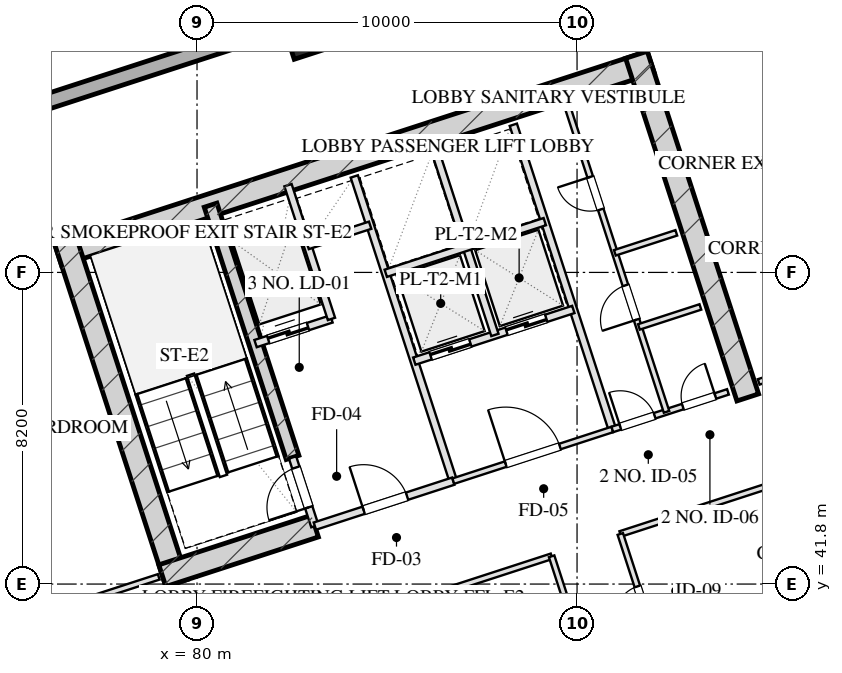
"""IFC4 building model, lengths in metres.
Left out: names, types, materials, properties, quantities, classifications, styles, units other than length and angle.
Written with IfcOpenShell. Run it as: python <this file> out.ifc"""

import sys

from ifc_helpers import new_model, si_unit, direction, frame, frame_2d, origin, origin_2d, place, context, subcontext, project, spatial, rectangle, hollow_rectangle, extrude, element, fill, save


model = new_model("IFC4")
c1 = context("Model", 3, precision=1e-05, world=origin(), true_north=direction((0.0, 1.0)))
c2 = subcontext(c1, "Body", "Model", "MODEL_VIEW")
j1 = project(units=[si_unit("LENGTHUNIT", "METRE"), si_unit("PLANEANGLEUNIT", "RADIAN")], contexts=[c1])
p1 = place(None, origin())
s1 = spatial("IfcSite", under=j1, at=p1, CompositionType="ELEMENT")
p2 = place(p1, origin())
s2 = spatial("IfcBuilding", under=s1, at=p2, CompositionType="ELEMENT")
p3 = place(p2, frame((0.0, 0.0, 166.75)))
s3 = spatial("IfcBuildingStorey", under=s2, at=p3, CompositionType="ELEMENT", Elevation=166.75)
p4 = place(p3, frame((76.344, 50.466, 0.0), z_axis=(0.0, 0.0, 1.0), x_axis=(0.951055727519, 0.309019421968, 0.0)))
e1 = element("IfcWall", 1, at=p4, inside=s3, PredefinedType="SHEAR", context=c2, shape_type="SweptSolid", body=[
    extrude(rectangle(XDim=16.4, YDim=0.6, at=frame_2d((8.2, 0.0))), origin(), (0.0, 0.0, 1.0), 3.45),
])
for number, where, z_axis, x_axis in (
    (2, (79.466, 41.828, 0.0), (0.0, 0.0, 1.0), (-0.309, 0.951, 0.0)),
    (3, (94.492, 46.71, 0.0), (0.0, 0.0, 1.0), (-0.309, 0.951, 0.0)),
):
    element("IfcWall", number, at=place(p3, frame(where, z_axis=z_axis, x_axis=x_axis)), inside=s3, PredefinedType="SHEAR", context=c2, shape_type="SweptSolid", body=[
        extrude(rectangle(XDim=9.48, YDim=0.6, at=frame_2d((4.74, 0.0))), origin(), (0.0, 0.0, 1.0), 3.45),
    ])
p5 = place(p3, frame((82.514, 45.131, 0.0), z_axis=(0.0, 0.0, 1.0), x_axis=(-0.308988790936, 0.951065679686, 0.0)))
e4 = element("IfcWall", 4, at=p5, inside=s3, PredefinedType="SHEAR", context=c2, shape_type="SweptSolid", body=[
    extrude(rectangle(XDim=6.98, YDim=0.35, at=frame_2d((3.49, 0.0))), origin(), (0.0, 0.0, 1.0), 3.45),
])
p6 = place(p3, frame((79.087, 42.021, 0.0), z_axis=(0.0, 0.0, 1.0), x_axis=(0.951062550203, 0.3089984233, 0.0)))
e5 = element("IfcWall", 5, at=p6, inside=s3, PredefinedType="SHEAR", context=c2, shape_type="SweptSolid", body=[
    extrude(rectangle(XDim=4.22, YDim=0.6, at=frame_2d((2.11, 0.0))), origin(), (0.0, 0.0, 1.0), 3.45),
])
p7 = place(p3, frame((82.815, 56.112, 0.0), z_axis=(0.0, 0.0, 1.0), x_axis=(0.951056516295, 0.309016994375, 0.0)))
e6 = element("IfcColumn", 6, at=p7, inside=s3, PredefinedType="COLUMN", context=c2, shape_type="SweptSolid", body=[
    extrude(hollow_rectangle(XDim=0.8, YDim=0.8, WallThickness=0.028, at=origin_2d()), origin(), (0.0, 0.0, 1.0), 3.451),
])
p8 = place(p3, frame((81.776, 8.827, 0.0), z_axis=(0.0, 0.0, 1.0), x_axis=(-0.309014228706, 0.951057414911, 0.0)))
e7 = element("IfcWall", 7, at=p8, inside=s3, PredefinedType="SOLIDWALL", context=c2, shape_type="SweptSolid", body=[
    extrude(rectangle(XDim=42.8, YDim=0.4, at=frame_2d((21.4, 0.0))), origin(), (0.0, 0.0, 1.0), 2.61),
])
p9 = place(p8, frame((17.75, 0.0, 0.0)))
e8 = element("IfcOpeningElement", 8, at=p9, cuts=e7, PredefinedType="OPENING", context=c2, shape_type="SweptSolid", body=[
    extrude(rectangle(XDim=1.1, YDim=2.15, at=frame_2d((0.55, 1.075))), frame((0.0, 0.21, 0.0), z_axis=(0.0, -1.0, 0.0), x_axis=(1.0, 0.0, 0.0)), (0.0, 0.0, 1.0), 0.42),
])
p10 = place(p3, frame((70.092, 52.556, 0.0), z_axis=(0.0, 0.0, 1.0), x_axis=(0.951057580055, 0.30901372044, 0.0)))
e9 = element("IfcWall", 9, at=p10, inside=s3, PredefinedType="SOLIDWALL", context=c2, shape_type="SweptSolid", body=[
    extrude(rectangle(XDim=26.4, YDim=0.4, at=frame_2d((13.2, 0.0))), origin(), (0.0, 0.0, 1.0), 2.61),
])
p11 = place(p3, frame((83.101, 43.324, 0.0), z_axis=(0.0, 0.0, 1.0), x_axis=(-0.309048298632, 0.951046344356, 0.0)))
e10 = element("IfcWall", 10, at=p11, inside=s3, PredefinedType="PARTITIONING", context=c2, shape_type="SweptSolid", body=[
    extrude(rectangle(XDim=1.9, YDim=0.2, at=frame_2d((0.95, 0.0))), origin(), (0.0, 0.0, 1.0), 3.175),
])
p12 = place(p11, frame((0.52, 0.0, 0.0)))
e11 = element("IfcOpeningElement", 11, at=p12, cuts=e10, PredefinedType="OPENING", context=c2, shape_type="SweptSolid", body=[
    extrude(rectangle(XDim=1.1, YDim=2.05, at=frame_2d((0.55, 1.025))), frame((0.0, 0.11, 0.0), z_axis=(0.0, -1.0, 0.0), x_axis=(1.0, 0.0, 0.0)), (0.0, 0.0, 1.0), 0.22),
])
p13 = place(p3, frame((86.743, 44.508, 0.0), z_axis=(0.0, 0.0, 1.0), x_axis=(-0.309016001439, 0.951056838919, 0.0)))
e12 = element("IfcWall", 12, at=p13, inside=s3, PredefinedType="PARTITIONING", context=c2, shape_type="SweptSolid", body=[
    extrude(rectangle(XDim=8.43, YDim=0.2, at=frame_2d((4.215, 0.0))), origin(), (0.0, 0.0, 1.0), 3.175),
])
p14 = place(p3, frame((83.101, 43.324, 0.0), z_axis=(0.0, 0.0, 1.0), x_axis=(0.951052804469, 0.309028417967, 0.0)))
e13 = element("IfcWall", 13, at=p14, inside=s3, PredefinedType="PARTITIONING", context=c2, shape_type="SweptSolid", body=[
    extrude(rectangle(XDim=3.83, YDim=0.2, at=frame_2d((1.915, 0.0))), origin(), (0.0, 0.0, 1.0), 3.175),
])
p15 = place(p14, frame((1.35, 0.0, 0.0)))
e14 = element("IfcOpeningElement", 14, at=p15, cuts=e13, PredefinedType="OPENING", context=c2, shape_type="SweptSolid", body=[
    extrude(rectangle(XDim=1.2, YDim=2.05, at=frame_2d((0.6, 1.025))), frame((0.0, 0.11, 0.0), z_axis=(0.0, -1.0, 0.0), x_axis=(1.0, 0.0, 0.0)), (0.0, 0.0, 1.0), 0.22),
])
p16 = place(p3, frame((81.54, 48.127, 0.0), z_axis=(0.0, 0.0, 1.0), x_axis=(0.951062257173, 0.308999325213, 0.0)))
e15 = element("IfcWall", 15, at=p16, inside=s3, PredefinedType="PARTITIONING", context=c2, shape_type="SweptSolid", body=[
    extrude(rectangle(XDim=2.1, YDim=0.2, at=frame_2d((1.05, 0.0))), origin(), (0.0, 0.0, 1.0), 3.175),
])
p17 = place(p16, frame((0.35, 0.0, 0.0)))
e16 = element("IfcOpeningElement", 16, at=p17, cuts=e15, PredefinedType="OPENING", context=c2, shape_type="SweptSolid", body=[
    extrude(rectangle(XDim=1.1, YDim=2.05, at=frame_2d((0.55, 1.025))), frame((0.0, 0.11, 0.0), z_axis=(0.0, -1.0, 0.0), x_axis=(1.0, 0.0, 0.0)), (0.0, 0.0, 1.0), 0.22),
])
p18 = place(p3, frame((83.538, 48.776, 0.0), z_axis=(0.0, 0.0, 1.0), x_axis=(-0.3089935693, 0.951064127245, 0.0)))
e17 = element("IfcWall", 17, at=p18, inside=s3, PredefinedType="PARTITIONING", context=c2, shape_type="SweptSolid", body=[
    extrude(rectangle(XDim=3.7, YDim=0.2, at=frame_2d((1.85, 0.0))), origin(), (0.0, 0.0, 1.0), 3.175),
])
p19 = place(p3, frame((82.91, 50.707, 0.0), z_axis=(0.0, 0.0, 1.0), x_axis=(0.951041328149, 0.309063734775, 0.0)))
e18 = element("IfcWall", 18, at=p19, inside=s3, PredefinedType="PARTITIONING", context=c2, shape_type="SweptSolid", body=[
    extrude(rectangle(XDim=1.73, YDim=0.2, at=frame_2d((0.865, 0.0))), origin(), (0.0, 0.0, 1.0), 3.175),
])
p20 = place(p3, frame((90.928, 45.868, 0.0), z_axis=(0.0, 0.0, 1.0), x_axis=(-0.309042196757, 0.951048327176, 0.0)))
e19 = element("IfcWall", 19, at=p20, inside=s3, PredefinedType="PARTITIONING", context=c2, shape_type="SweptSolid", body=[
    extrude(rectangle(XDim=8.43, YDim=0.2, at=frame_2d((4.215, 0.0))), origin(), (0.0, 0.0, 1.0), 3.175),
])
p21 = place(p3, frame((86.743, 44.508, 0.0), z_axis=(0.0, 0.0, 1.0), x_axis=(0.951063829732, 0.308994485023, 0.0)))
e20 = element("IfcWall", 20, at=p21, inside=s3, PredefinedType="PARTITIONING", context=c2, shape_type="SweptSolid", body=[
    extrude(rectangle(XDim=4.4, YDim=0.15, at=frame_2d((2.2, 0.0))), origin(), (0.0, 0.0, 1.0), 3.175),
])
p22 = place(p21, frame((1.45, 0.0, 0.0)))
e21 = element("IfcOpeningElement", 21, at=p22, cuts=e20, PredefinedType="OPENING", context=c2, shape_type="SweptSolid", body=[
    extrude(rectangle(XDim=1.5, YDim=2.05, at=frame_2d((0.75, 1.025))), frame((0.0, 0.085, 0.0), z_axis=(0.0, -1.0, 0.0), x_axis=(1.0, 0.0, 0.0)), (0.0, 0.0, 1.0), 0.17),
])
p23 = place(p3, frame((85.718, 47.666, 0.0), z_axis=(0.0, 0.0, 1.0), x_axis=(0.951058531764, 0.30901079133, 0.0)))
e22 = element("IfcWall", 22, at=p23, inside=s3, PredefinedType="PARTITIONING", context=c2, shape_type="SweptSolid", body=[
    extrude(rectangle(XDim=4.4, YDim=0.2, at=frame_2d((2.2, 0.0))), origin(), (0.0, 0.0, 1.0), 3.175),
])
p24 = place(p23, frame((0.45, 0.0, 0.0)))
e23 = element("IfcOpeningElement", 23, at=p24, cuts=e22, PredefinedType="OPENING", context=c2, shape_type="SweptSolid", body=[
    extrude(rectangle(XDim=1.1, YDim=2.05, at=frame_2d((0.55, 1.025))), frame((0.0, 0.11, 0.0), z_axis=(0.0, -1.0, 0.0), x_axis=(1.0, 0.0, 0.0)), (0.0, 0.0, 1.0), 0.22),
])
p25 = place(p23, frame((2.55, 0.0, 0.0)))
e24 = element("IfcOpeningElement", 24, at=p25, cuts=e22, PredefinedType="OPENING", context=c2, shape_type="SweptSolid", body=[
    extrude(rectangle(XDim=1.1, YDim=2.05, at=frame_2d((0.55, 1.025))), frame((0.0, 0.11, 0.0), z_axis=(0.0, -1.0, 0.0), x_axis=(1.0, 0.0, 0.0)), (0.0, 0.0, 1.0), 0.22),
])
p26 = place(p3, frame((87.838, 48.354, 0.0), z_axis=(0.0, 0.0, 1.0), x_axis=(-0.3090093719, 0.951058992953, 0.0)))
e25 = element("IfcWall", 25, at=p26, inside=s3, PredefinedType="PARTITIONING", context=c2, shape_type="SweptSolid", body=[
    extrude(rectangle(XDim=5.11, YDim=0.2, at=frame_2d((2.555, 0.0))), origin(), (0.0, 0.0, 1.0), 3.175),
])
p27 = place(p3, frame((84.967, 49.977, 0.0), z_axis=(0.0, 0.0, 1.0), x_axis=(0.951063829732, 0.308994485023, 0.0)))
e26 = element("IfcWall", 26, at=p27, inside=s3, PredefinedType="PARTITIONING", context=c2, shape_type="SweptSolid", body=[
    extrude(rectangle(XDim=4.4, YDim=0.2, at=frame_2d((2.2, 0.0))), origin(), (0.0, 0.0, 1.0), 3.175),
])
p28 = place(p3, frame((90.928, 45.868, 0.0), z_axis=(0.0, 0.0, 1.0), x_axis=(0.951059297078, 0.309008435874, 0.0)))
e27 = element("IfcWall", 27, at=p28, inside=s3, PredefinedType="PARTITIONING", context=c2, shape_type="SweptSolid", body=[
    extrude(rectangle(XDim=3.2, YDim=0.15, at=frame_2d((1.6, 0.0))), origin(), (0.0, 0.0, 1.0), 3.175),
])
p29 = place(p28, frame((0.22, 0.0, 0.0)))
e28 = element("IfcOpeningElement", 28, at=p29, cuts=e27, PredefinedType="OPENING", context=c2, shape_type="SweptSolid", body=[
    extrude(rectangle(XDim=0.95, YDim=2.05, at=frame_2d((0.475, 1.025))), frame((0.0, 0.085, 0.0), z_axis=(0.0, -1.0, 0.0), x_axis=(1.0, 0.0, 0.0)), (0.0, 0.0, 1.0), 0.17),
])
p30 = place(p28, frame((1.95, 0.0, 0.0)))
e29 = element("IfcOpeningElement", 29, at=p30, cuts=e27, PredefinedType="OPENING", context=c2, shape_type="SweptSolid", body=[
    extrude(rectangle(XDim=0.9, YDim=2.05, at=frame_2d((0.45, 1.025))), frame((0.0, 0.085, 0.0), z_axis=(0.0, -1.0, 0.0), x_axis=(1.0, 0.0, 0.0)), (0.0, 0.0, 1.0), 0.17),
])
p31 = place(p3, frame((92.355, 46.331, 0.0), z_axis=(0.0, 0.0, 1.0), x_axis=(-0.309007490203, 0.951059604335, 0.0)))
e30 = element("IfcWall", 30, at=p31, inside=s3, PredefinedType="PARTITIONING", context=c2, shape_type="SweptSolid", body=[
    extrude(rectangle(XDim=8.43, YDim=0.15, at=frame_2d((4.215, 0.0))), origin(), (0.0, 0.0, 1.0), 3.175),
])
p32 = place(p31, frame((2.55, 0.0, 0.0)))
e31 = element("IfcOpeningElement", 31, at=p32, cuts=e30, PredefinedType="OPENING", context=c2, shape_type="SweptSolid", body=[
    extrude(rectangle(XDim=0.95, YDim=2.05, at=frame_2d((0.475, 1.025))), frame((0.0, 0.085, 0.0), z_axis=(0.0, -1.0, 0.0), x_axis=(1.0, 0.0, 0.0)), (0.0, 0.0, 1.0), 0.17),
])
p33 = place(p31, frame((5.6, 0.0, 0.0)))
e32 = element("IfcOpeningElement", 32, at=p33, cuts=e30, PredefinedType="OPENING", context=c2, shape_type="SweptSolid", body=[
    extrude(rectangle(XDim=0.9, YDim=2.05, at=frame_2d((0.45, 1.025))), frame((0.0, 0.085, 0.0), z_axis=(0.0, -1.0, 0.0), x_axis=(1.0, 0.0, 0.0)), (0.0, 0.0, 1.0), 0.17),
])
p34 = place(p3, frame((90.995, 50.516, 0.0), z_axis=(0.0, 0.0, 1.0), x_axis=(0.951040401051, 0.309066587596, 0.0)))
e33 = element("IfcWall", 33, at=p34, inside=s3, PredefinedType="PARTITIONING", context=c2, shape_type="SweptSolid", body=[
    extrude(rectangle(XDim=1.7, YDim=0.15, at=frame_2d((0.85, 0.0))), origin(), (0.0, 0.0, 1.0), 3.175),
])
p35 = place(p3, frame((91.628, 48.566, 0.0), z_axis=(0.0, 0.0, 1.0), x_axis=(0.951054116971, 0.309024378638, 0.0)))
e34 = element("IfcWall", 34, at=p35, inside=s3, PredefinedType="PARTITIONING", context=c2, shape_type="SweptSolid", body=[
    extrude(rectangle(XDim=1.7, YDim=0.15, at=frame_2d((0.85, 0.0))), origin(), (0.0, 0.0, 1.0), 3.175),
])
p36 = place(p3, frame((71.955, 39.703, 0.0), z_axis=(0.0, 0.0, 1.0), x_axis=(0.951060977215, 0.309003264738, 0.0)))
e35 = element("IfcWall", 35, at=p36, inside=s3, PredefinedType="PARTITIONING", context=c2, shape_type="SweptSolid", body=[
    extrude(rectangle(XDim=7.4, YDim=0.15, at=frame_2d((3.7, 0.0))), origin(), (0.0, 0.0, 1.0), 3.175),
])
p37 = place(p36, frame((3.108, 0.0, 0.0)))
e36 = element("IfcOpeningElement", 36, at=p37, cuts=e35, PredefinedType="OPENING", context=c2, shape_type="SweptSolid", body=[
    extrude(rectangle(XDim=1.0, YDim=2.05, at=frame_2d((0.5, 1.025))), frame((0.0, 0.085, 0.0), z_axis=(0.0, -1.0, 0.0), x_axis=(1.0, 0.0, 0.0)), (0.0, 0.0, 1.0), 0.17),
])
p38 = place(p3, frame((94.78, 47.119, 0.0), z_axis=(0.0, 0.0, 1.0), x_axis=(0.951057811516, 0.309013008068, 0.0)))
e37 = element("IfcWall", 37, at=p38, inside=s3, PredefinedType="PARTITIONING", context=c2, shape_type="SweptSolid", body=[
    extrude(rectangle(XDim=6.8, YDim=0.15, at=frame_2d((3.4, 0.0))), origin(), (0.0, 0.0, 1.0), 3.175),
])
p39 = place(p38, frame((2.856, 0.0, 0.0)))
e38 = element("IfcOpeningElement", 38, at=p39, cuts=e37, PredefinedType="OPENING", context=c2, shape_type="SweptSolid", body=[
    extrude(rectangle(XDim=0.85, YDim=2.05, at=frame_2d((0.425, 1.025))), frame((0.0, 0.085, 0.0), z_axis=(0.0, -1.0, 0.0), x_axis=(1.0, 0.0, 0.0)), (0.0, 0.0, 1.0), 0.17),
])
p40 = place(p3, frame((81.152, 39.873, 0.0), z_axis=(0.0, 0.0, 1.0), x_axis=(0.951057640494, 0.309013534425, 0.0)))
e39 = element("IfcWall", 39, at=p40, inside=s3, PredefinedType="PARTITIONING", context=c2, shape_type="SweptSolid", body=[
    extrude(rectangle(XDim=8.6, YDim=0.15, at=frame_2d((4.3, 0.0))), origin(), (0.0, 0.0, 1.0), 3.175),
])
p41 = place(p3, frame((91.138, 43.118, 0.0), z_axis=(0.0, 0.0, 1.0), x_axis=(0.951054972381, 0.309021746015, 0.0)))
e40 = element("IfcWall", 40, at=p41, inside=s3, PredefinedType="PARTITIONING", context=c2, shape_type="SweptSolid", body=[
    extrude(rectangle(XDim=11.5, YDim=0.15, at=frame_2d((5.75, 0.0))), origin(), (0.0, 0.0, 1.0), 3.175),
])
p42 = place(p3, frame((94.473, 26.705, 0.0), z_axis=(0.0, 0.0, 1.0), x_axis=(-0.309022042254, 0.951054876125, 0.0)))
e41 = element("IfcWall", 41, at=p42, inside=s3, PredefinedType="PARTITIONING", context=c2, shape_type="SweptSolid", body=[
    extrude(rectangle(XDim=16.64, YDim=0.15, at=frame_2d((8.32, 0.0))), origin(), (0.0, 0.0, 1.0), 3.175),
])
p43 = place(p3, frame((96.28, 27.292, 0.0), z_axis=(0.0, 0.0, 1.0), x_axis=(-0.309008771245, 0.951059188113, 0.0)))
e42 = element("IfcWall", 42, at=p43, inside=s3, PredefinedType="PARTITIONING", context=c2, shape_type="SweptSolid", body=[
    extrude(rectangle(XDim=16.64, YDim=0.15, at=frame_2d((8.32, 0.0))), origin(), (0.0, 0.0, 1.0), 3.175),
])
p44 = place(p43, frame((1.526, 0.0, 0.0)))
e43 = element("IfcOpeningElement", 43, at=p44, cuts=e42, PredefinedType="OPENING", context=c2, shape_type="SweptSolid", body=[
    extrude(rectangle(XDim=1.0, YDim=2.05, at=frame_2d((0.5, 1.025))), frame((0.0, 0.085, 0.0), z_axis=(0.0, -1.0, 0.0), x_axis=(1.0, 0.0, 0.0)), (0.0, 0.0, 1.0), 0.17),
])
p45 = place(p43, frame((6.026, 0.0, 0.0)))
e44 = element("IfcOpeningElement", 44, at=p45, cuts=e42, PredefinedType="OPENING", context=c2, shape_type="SweptSolid", body=[
    extrude(rectangle(XDim=1.05, YDim=2.05, at=frame_2d((0.525, 1.025))), frame((0.0, 0.085, 0.0), z_axis=(0.0, -1.0, 0.0), x_axis=(1.0, 0.0, 0.0)), (0.0, 0.0, 1.0), 0.17),
])
p46 = place(p43, frame((10.519, 0.0, 0.0)))
e45 = element("IfcOpeningElement", 45, at=p46, cuts=e42, PredefinedType="OPENING", context=c2, shape_type="SweptSolid", body=[
    extrude(rectangle(XDim=1.0, YDim=2.05, at=frame_2d((0.5, 1.025))), frame((0.0, 0.085, 0.0), z_axis=(0.0, -1.0, 0.0), x_axis=(1.0, 0.0, 0.0)), (0.0, 0.0, 1.0), 0.17),
])
p47 = place(p43, frame((14.338, 0.0, 0.0)))
e46 = element("IfcOpeningElement", 46, at=p47, cuts=e42, PredefinedType="OPENING", context=c2, shape_type="SweptSolid", body=[
    extrude(rectangle(XDim=0.85, YDim=2.05, at=frame_2d((0.425, 1.025))), frame((0.0, 0.085, 0.0), z_axis=(0.0, -1.0, 0.0), x_axis=(1.0, 0.0, 0.0)), (0.0, 0.0, 1.0), 0.17),
])
p48 = place(p3, frame((92.251, 39.691, 0.0), z_axis=(0.0, 0.0, 1.0), x_axis=(0.951063238644, 0.308996304347, 0.0)))
e47 = element("IfcWall", 47, at=p48, inside=s3, PredefinedType="PARTITIONING", context=c2, shape_type="SweptSolid", body=[
    extrude(rectangle(XDim=11.5, YDim=0.15, at=frame_2d((5.75, 0.0))), origin(), (0.0, 0.0, 1.0), 3.175),
])
p49 = place(p12, origin())
e48 = element("IfcDoor", 48, at=p49, inside=s3, OperationType="SINGLE_SWING_LEFT", PredefinedType="DOOR", context=c2, shape_type="SweptSolid", body=[
    extrude(rectangle(XDim=1.1, YDim=2.05, at=frame_2d((0.55, 1.025))), frame((0.0, 0.025, 0.0), z_axis=(0.0, -1.0, 0.0), x_axis=(1.0, 0.0, 0.0)), (0.0, 0.0, 1.0), 0.05),
])
fill(e11, e48)
p50 = place(p15, origin())
e49 = element("IfcDoor", 49, at=p50, inside=s3, OperationType="SINGLE_SWING_LEFT", PredefinedType="DOOR", context=c2, shape_type="SweptSolid", body=[
    extrude(rectangle(XDim=1.2, YDim=2.05, at=frame_2d((0.6, 1.025))), frame((0.0, 0.025, 0.0), z_axis=(0.0, -1.0, 0.0), x_axis=(1.0, 0.0, 0.0)), (0.0, 0.0, 1.0), 0.05),
])
fill(e14, e49)
p51 = place(p17, origin())
e50 = element("IfcDoor", 50, at=p51, inside=s3, OperationType="DOUBLE_DOOR_SLIDING", PredefinedType="DOOR", context=c2, shape_type="SweptSolid", body=[
    extrude(rectangle(XDim=1.1, YDim=2.05, at=frame_2d((0.55, 1.025))), frame((0.0, 0.025, 0.0), z_axis=(0.0, -1.0, 0.0), x_axis=(1.0, 0.0, 0.0)), (0.0, 0.0, 1.0), 0.05),
])
fill(e16, e50)
p52 = place(p22, origin())
e51 = element("IfcDoor", 51, at=p52, inside=s3, OperationType="SINGLE_SWING_LEFT", PredefinedType="DOOR", context=c2, shape_type="SweptSolid", body=[
    extrude(rectangle(XDim=1.5, YDim=2.05, at=frame_2d((0.75, 1.025))), frame((0.0, 0.025, 0.0), z_axis=(0.0, -1.0, 0.0), x_axis=(1.0, 0.0, 0.0)), (0.0, 0.0, 1.0), 0.05),
])
fill(e21, e51)
p53 = place(p24, origin())
e52 = element("IfcDoor", 52, at=p53, inside=s3, OperationType="DOUBLE_DOOR_SLIDING", PredefinedType="DOOR", context=c2, shape_type="SweptSolid", body=[
    extrude(rectangle(XDim=1.1, YDim=2.05, at=frame_2d((0.55, 1.025))), frame((0.0, 0.025, 0.0), z_axis=(0.0, -1.0, 0.0), x_axis=(1.0, 0.0, 0.0)), (0.0, 0.0, 1.0), 0.05),
])
fill(e23, e52)
p54 = place(p25, origin())
e53 = element("IfcDoor", 53, at=p54, inside=s3, OperationType="DOUBLE_DOOR_SLIDING", PredefinedType="DOOR", context=c2, shape_type="SweptSolid", body=[
    extrude(rectangle(XDim=1.1, YDim=2.05, at=frame_2d((0.55, 1.025))), frame((0.0, 0.025, 0.0), z_axis=(0.0, -1.0, 0.0), x_axis=(1.0, 0.0, 0.0)), (0.0, 0.0, 1.0), 0.05),
])
fill(e24, e53)
p55 = place(p29, origin())
e54 = element("IfcDoor", 54, at=p55, inside=s3, OperationType="SINGLE_SWING_LEFT", PredefinedType="DOOR", context=c2, shape_type="SweptSolid", body=[
    extrude(rectangle(XDim=0.95, YDim=2.05, at=frame_2d((0.475, 1.025))), frame((0.0, 0.025, 0.0), z_axis=(0.0, -1.0, 0.0), x_axis=(1.0, 0.0, 0.0)), (0.0, 0.0, 1.0), 0.05),
])
fill(e28, e54)
p56 = place(p30, origin())
e55 = element("IfcDoor", 55, at=p56, inside=s3, OperationType="SINGLE_SWING_RIGHT", PredefinedType="DOOR", context=c2, shape_type="SweptSolid", body=[
    extrude(rectangle(XDim=0.9, YDim=2.05, at=frame_2d((0.45, 1.025))), frame((0.0, 0.025, 0.0), z_axis=(0.0, -1.0, 0.0), x_axis=(1.0, 0.0, 0.0)), (0.0, 0.0, 1.0), 0.05),
])
fill(e29, e55)
p57 = place(p32, origin())
e56 = element("IfcDoor", 56, at=p57, inside=s3, OperationType="SINGLE_SWING_LEFT", PredefinedType="DOOR", context=c2, shape_type="SweptSolid", body=[
    extrude(rectangle(XDim=0.95, YDim=2.05, at=frame_2d((0.475, 1.025))), frame((0.0, 0.025, 0.0), z_axis=(0.0, -1.0, 0.0), x_axis=(1.0, 0.0, 0.0)), (0.0, 0.0, 1.0), 0.05),
])
fill(e31, e56)
p58 = place(p33, origin())
e57 = element("IfcDoor", 57, at=p58, inside=s3, OperationType="SINGLE_SWING_RIGHT", PredefinedType="DOOR", context=c2, shape_type="SweptSolid", body=[
    extrude(rectangle(XDim=0.9, YDim=2.05, at=frame_2d((0.45, 1.025))), frame((0.0, 0.025, 0.0), z_axis=(0.0, -1.0, 0.0), x_axis=(1.0, 0.0, 0.0)), (0.0, 0.0, 1.0), 0.05),
])
fill(e32, e57)
p59 = place(p47, origin())
e58 = element("IfcDoor", 58, at=p59, inside=s3, OperationType="SINGLE_SWING_LEFT", PredefinedType="DOOR", context=c2, shape_type="SweptSolid", body=[
    extrude(rectangle(XDim=0.85, YDim=2.05, at=frame_2d((0.425, 1.025))), frame((0.0, 0.025, 0.0), z_axis=(0.0, -1.0, 0.0), x_axis=(1.0, 0.0, 0.0)), (0.0, 0.0, 1.0), 0.05),
])
fill(e46, e58)
save(model, sys.argv[1])
